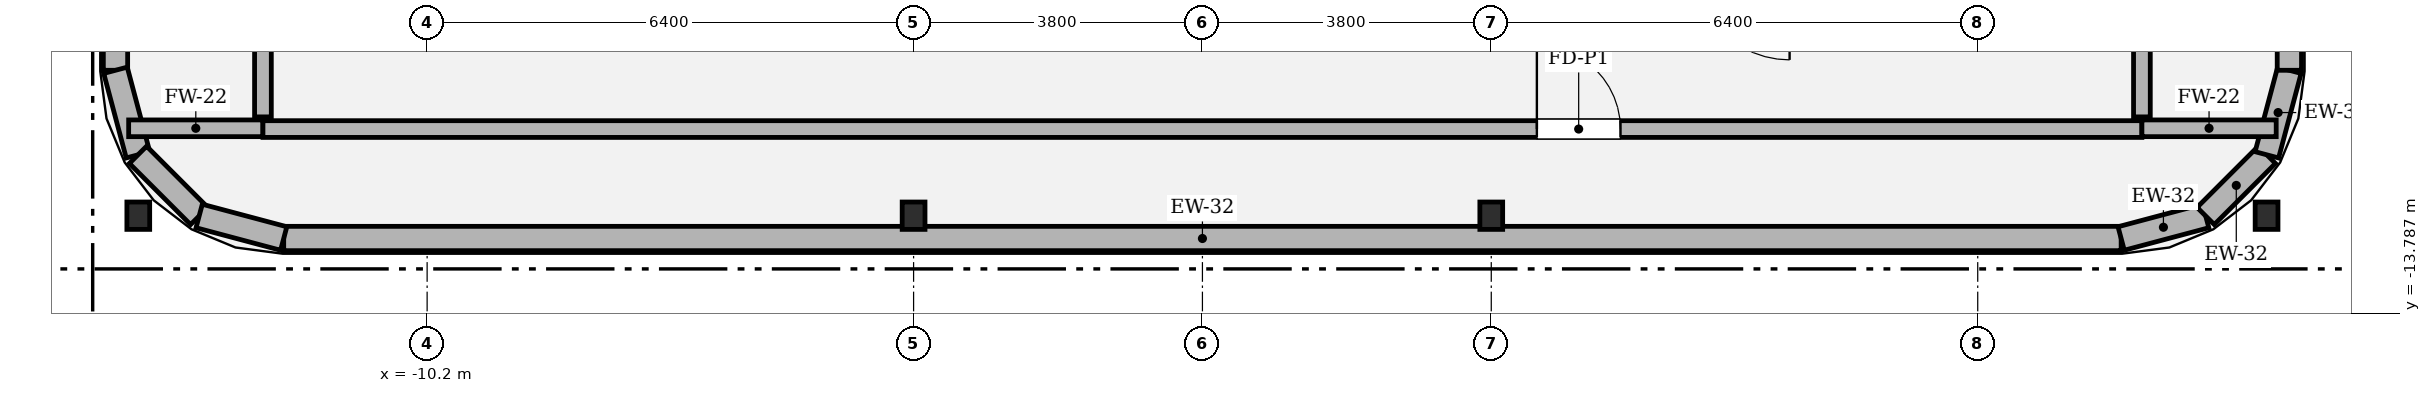
"""IFC4 building model, lengths in metres.
Left out: names, types, materials, properties, quantities, classifications, styles, units other than length and angle.
Written with IfcOpenShell. Run it as: python <this file> out.ifc"""

import sys

from ifc_helpers import new_model, si_unit, direction, frame, frame_2d, origin, origin_2d, place, context, subcontext, project, spatial, rectangle, i_section, extrude, element, fill, save


model = new_model("IFC4")
c1 = context("Model", 3, precision=1e-05, world=origin(), true_north=direction((0.0, 1.0)))
c2 = subcontext(c1, "Body", "Model", "MODEL_VIEW")
j1 = project(units=[si_unit("LENGTHUNIT", "METRE"), si_unit("PLANEANGLEUNIT", "RADIAN")], contexts=[c1])
p1 = place(None, origin())
s1 = spatial("IfcSite", under=j1, at=p1, CompositionType="ELEMENT")
p2 = place(p1, origin())
s2 = spatial("IfcBuilding", under=s1, at=p2, CompositionType="ELEMENT")
p3 = place(p2, frame((0.0, 0.0, 366.3)))
s3 = spatial("IfcBuildingStorey", under=s2, at=p3, CompositionType="ELEMENT", Elevation=366.3)
for number, where, z_axis, x_axis in (
    (1, (-3.8, -12.5, 0.0), (0.0, 0.0, 1.0), (1.0, 0.0, 0.0)),
    (2, (3.8, -12.5, 0.0), (0.0, 0.0, 1.0), (1.0, 0.0, 0.0)),
    (3, (-14.0, -12.5, 0.0), (0.0, 0.0, 1.0), (1.0, 0.0, 0.0)),
    (4, (14.0, -12.5, 0.0), (0.0, 0.0, 1.0), (1.0, 0.0, 0.0)),
):
    element("IfcColumn", number, at=place(p3, frame(where, z_axis=z_axis, x_axis=x_axis)), inside=s3, PredefinedType="COLUMN", context=c2, shape_type="SweptSolid", body=[
        extrude(i_section(OverallWidth=0.3, OverallDepth=0.36, WebThickness=0.012, FlangeThickness=0.022, FilletRadius=0.018, at=origin_2d()), origin(), (0.0, 0.0, 1.0), 4.498),
    ])
p4 = place(p3, frame((-12.087, -12.8, 0.0), z_axis=(0.0, 0.0, 1.0), x_axis=(1.0, 0.0, 0.0)))
e5 = element("IfcWall", 5, at=p4, inside=s3, PredefinedType="SOLIDWALL", context=c2, shape_type="SweptSolid", body=[
    extrude(rectangle(XDim=24.174, YDim=0.32, at=frame_2d((12.087, 0.0))), origin(), (0.0, 0.0, 1.0), 3.924),
])
p5 = place(p3, frame((12.087, -12.8, 0.0), z_axis=(0.0, 0.0, 1.0), x_axis=(0.966336954372, 0.25727979053, 0.0)))
e6 = element("IfcWall", 6, at=p5, inside=s3, PredefinedType="SOLIDWALL", context=c2, shape_type="SweptSolid", body=[
    extrude(rectangle(XDim=1.151, YDim=0.32, at=frame_2d((0.576, 0.0))), origin(), (0.0, 0.0, 1.0), 3.924),
])
p6 = place(p3, frame((13.199, -12.504, 0.0), z_axis=(0.0, 0.0, 1.0), x_axis=(0.707106781187, 0.707106781187, 0.0)))
e7 = element("IfcWall", 7, at=p6, inside=s3, PredefinedType="SOLIDWALL", context=c2, shape_type="SweptSolid", body=[
    extrude(rectangle(XDim=1.138, YDim=0.32, at=frame_2d((0.569, 0.0))), origin(), (0.0, 0.0, 1.0), 3.924),
])
p7 = place(p3, frame((14.004, -11.699, 0.0), z_axis=(0.0, 0.0, 1.0), x_axis=(0.25727979053, 0.966336954372, 0.0)))
e8 = element("IfcWall", 8, at=p7, inside=s3, PredefinedType="SOLIDWALL", context=c2, shape_type="SweptSolid", body=[
    extrude(rectangle(XDim=1.151, YDim=0.32, at=frame_2d((0.576, 0.0))), origin(), (0.0, 0.0, 1.0), 3.924),
])
for number, where, z_axis, x_axis in (
    (9, (14.3, -10.587, 0.0), (0.0, 0.0, 1.0), (0.0, 1.0, 0.0)),
    (10, (-14.3, 10.587, 0.0), (0.0, 0.0, 1.0), (0.0, -1.0, 0.0)),
):
    element("IfcWall", number, at=place(p3, frame(where, z_axis=z_axis, x_axis=x_axis)), inside=s3, PredefinedType="SOLIDWALL", context=c2, shape_type="SweptSolid", body=[
        extrude(rectangle(XDim=21.174, YDim=0.32, at=frame_2d((10.587, 0.0))), origin(), (0.0, 0.0, 1.0), 3.924),
    ])
p8 = place(p3, frame((-14.3, -10.587, 0.0), z_axis=(0.0, 0.0, 1.0), x_axis=(0.25727979053, -0.966336954372, 0.0)))
e11 = element("IfcWall", 11, at=p8, inside=s3, PredefinedType="SOLIDWALL", context=c2, shape_type="SweptSolid", body=[
    extrude(rectangle(XDim=1.151, YDim=0.32, at=frame_2d((0.576, 0.0))), origin(), (0.0, 0.0, 1.0), 3.924),
])
p9 = place(p3, frame((-14.004, -11.699, 0.0), z_axis=(0.0, 0.0, 1.0), x_axis=(0.707106781187, -0.707106781187, 0.0)))
e12 = element("IfcWall", 12, at=p9, inside=s3, PredefinedType="SOLIDWALL", context=c2, shape_type="SweptSolid", body=[
    extrude(rectangle(XDim=1.138, YDim=0.32, at=frame_2d((0.569, 0.0))), origin(), (0.0, 0.0, 1.0), 3.924),
])
p10 = place(p3, frame((-13.199, -12.504, 0.0), z_axis=(0.0, 0.0, 1.0), x_axis=(0.966336954372, -0.25727979053, 0.0)))
e13 = element("IfcWall", 13, at=p10, inside=s3, PredefinedType="SOLIDWALL", context=c2, shape_type="SweptSolid", body=[
    extrude(rectangle(XDim=1.151, YDim=0.32, at=frame_2d((0.576, 0.0))), origin(), (0.0, 0.0, 1.0), 3.924),
])
p11 = place(p3, frame((-14.127, -11.35, 0.0), z_axis=(0.0, 0.0, 1.0), x_axis=(1.0, 0.0, 0.0)))
e14 = element("IfcWall", 14, at=p11, inside=s3, PredefinedType="SOLIDWALL", context=c2, shape_type="SweptSolid", body=[
    extrude(rectangle(XDim=1.767, YDim=0.22, at=frame_2d((0.883, 0.0))), origin(), (0.0, 0.0, 1.0), 3.924),
])
p12 = place(p3, frame((-12.36, -11.36, 0.0), z_axis=(0.0, 0.0, 1.0), x_axis=(1.0, 0.0, 0.0)))
e15 = element("IfcWall", 15, at=p12, inside=s3, PredefinedType="SOLIDWALL", context=c2, shape_type="SweptSolid", body=[
    extrude(rectangle(XDim=24.72, YDim=0.22, at=frame_2d((12.36, 0.0))), origin(), (0.0, 0.0, 1.0), 3.924),
])
p13 = place(p12, frame((16.76, 0.0, 0.0)))
e16 = element("IfcOpeningElement", 16, at=p13, cuts=e15, PredefinedType="OPENING", context=c2, shape_type="SweptSolid", body=[
    extrude(rectangle(XDim=1.1, YDim=2.2, at=frame_2d((0.55, 1.1))), frame((0.0, 0.12, 0.0), z_axis=(0.0, -1.0, 0.0), x_axis=(1.0, 0.0, 0.0)), (0.0, 0.0, 1.0), 0.24),
])
p14 = place(p3, frame((12.36, -11.35, 0.0), z_axis=(0.0, 0.0, 1.0), x_axis=(1.0, 0.0, 0.0)))
e17 = element("IfcWall", 17, at=p14, inside=s3, PredefinedType="SOLIDWALL", context=c2, shape_type="SweptSolid", body=[
    extrude(rectangle(XDim=1.767, YDim=0.22, at=frame_2d((0.883, 0.0))), origin(), (0.0, 0.0, 1.0), 3.924),
])
p15 = place(p3, frame((-12.36, 11.2, 0.0), z_axis=(0.0, 0.0, 1.0), x_axis=(0.0, -1.0, 0.0)))
e18 = element("IfcWall", 18, at=p15, inside=s3, PredefinedType="SOLIDWALL", context=c2, shape_type="SweptSolid", body=[
    extrude(rectangle(XDim=22.4, YDim=0.22, at=frame_2d((11.2, 0.0))), origin(), (0.0, 0.0, 1.0), 3.924),
])
p16 = place(p15, frame((10.65, 0.0, 0.0)))
e19 = element("IfcOpeningElement", 19, at=p16, cuts=e18, PredefinedType="OPENING", context=c2, shape_type="SweptSolid", body=[
    extrude(rectangle(XDim=1.1, YDim=2.2, at=frame_2d((0.55, 1.1))), frame((0.0, 0.12, 0.0), z_axis=(0.0, -1.0, 0.0), x_axis=(1.0, 0.0, 0.0)), (0.0, 0.0, 1.0), 0.24),
])
p17 = place(p3, frame((12.36, -11.2, 0.0), z_axis=(0.0, 0.0, 1.0), x_axis=(0.0, 1.0, 0.0)))
e20 = element("IfcWall", 20, at=p17, inside=s3, PredefinedType="SOLIDWALL", context=c2, shape_type="SweptSolid", body=[
    extrude(rectangle(XDim=22.4, YDim=0.22, at=frame_2d((11.2, 0.0))), origin(), (0.0, 0.0, 1.0), 3.924),
])
p18 = place(p17, frame((10.65, 0.0, 0.0)))
e21 = element("IfcOpeningElement", 21, at=p18, cuts=e20, PredefinedType="OPENING", context=c2, shape_type="SweptSolid", body=[
    extrude(rectangle(XDim=1.1, YDim=2.2, at=frame_2d((0.55, 1.1))), frame((0.0, 0.12, 0.0), z_axis=(0.0, -1.0, 0.0), x_axis=(1.0, 0.0, 0.0)), (0.0, 0.0, 1.0), 0.24),
])
p19 = place(p13, origin())
e22 = element("IfcDoor", 22, at=p19, inside=s3, OperationType="SINGLE_SWING_LEFT", PredefinedType="DOOR", context=c2, shape_type="SweptSolid", body=[
    extrude(rectangle(XDim=1.1, YDim=2.2, at=frame_2d((0.55, 1.1))), frame((0.0, 0.025, 0.0), z_axis=(0.0, -1.0, 0.0), x_axis=(1.0, 0.0, 0.0)), (0.0, 0.0, 1.0), 0.05),
])
fill(e16, e22)
save(model, sys.argv[1])
